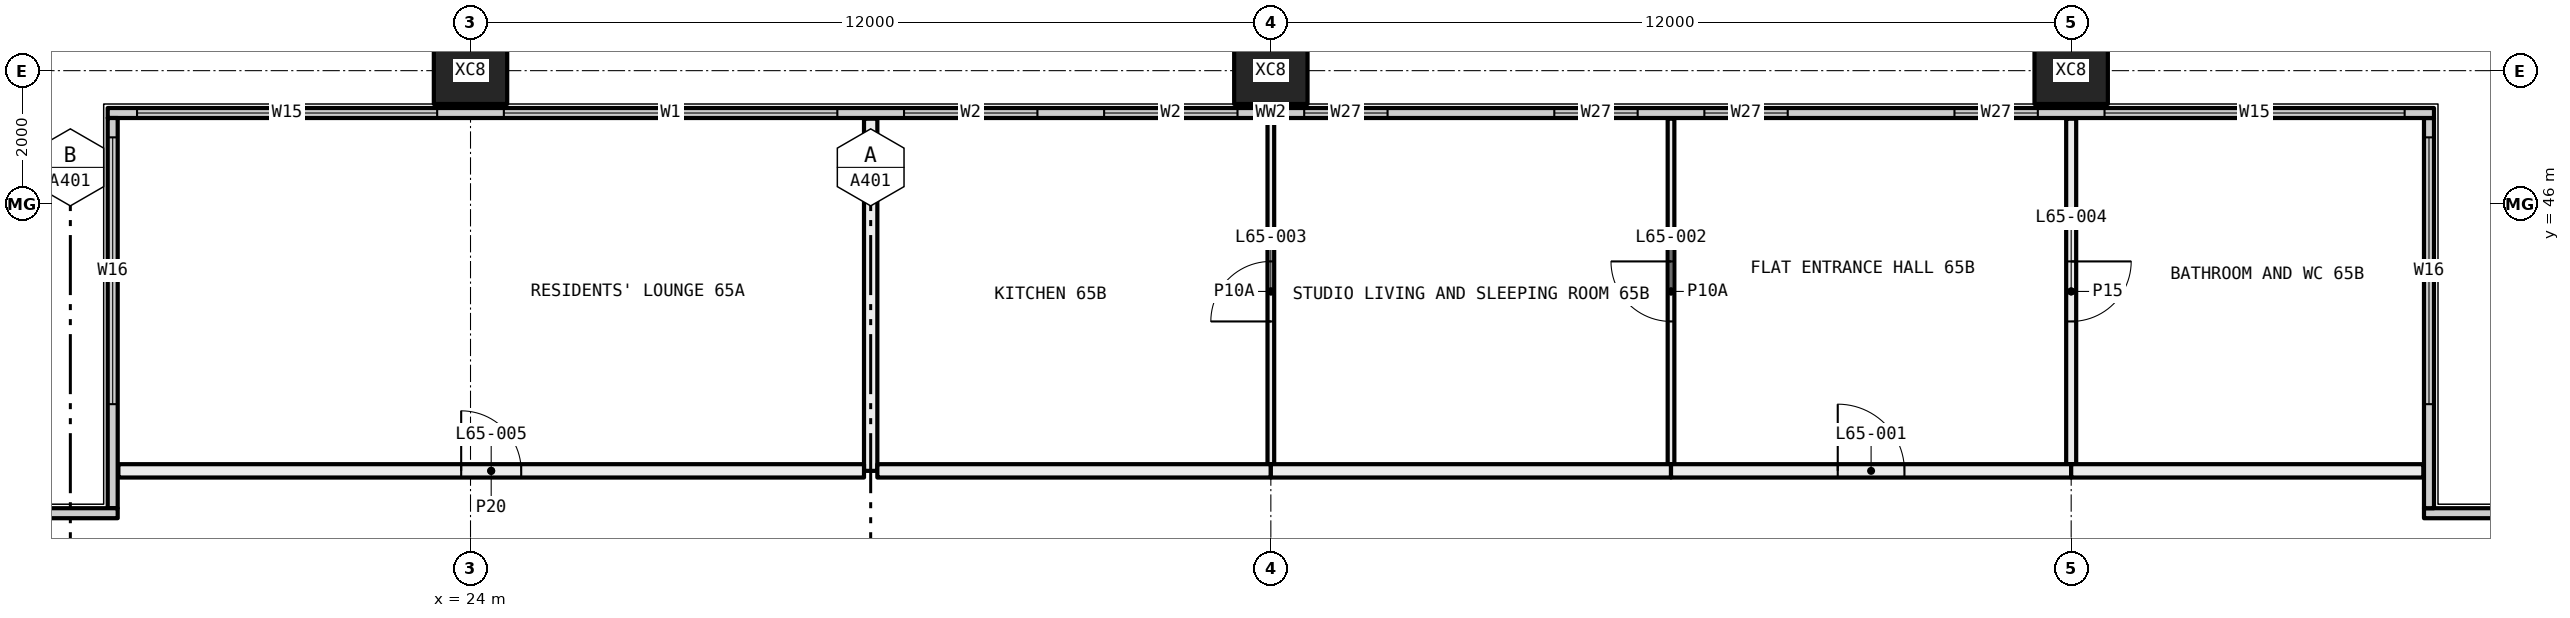
"""IFC4 building model, lengths in metres.
Left out: names, types, materials, properties, quantities, classifications, styles, units other than length and angle.
Written with IfcOpenShell. Run it as: python <this file> out.ifc"""

import sys

from ifc_helpers import new_model, si_unit, direction, frame, frame_2d, origin, origin_2d, place, context, subcontext, project, spatial, rectangle, hollow_rectangle, extrude, element, fill, save


model = new_model("IFC4")
c1 = context("Model", 3, precision=1e-05, world=origin(), true_north=direction((0.0, 1.0)))
c2 = subcontext(c1, "Body", "Model", "MODEL_VIEW")
j1 = project(units=[si_unit("LENGTHUNIT", "METRE"), si_unit("PLANEANGLEUNIT", "RADIAN")], contexts=[c1])
p1 = place(None, origin())
s1 = spatial("IfcSite", under=j1, at=p1, CompositionType="ELEMENT")
p2 = place(p1, origin())
s2 = spatial("IfcBuilding", under=s1, at=p2, CompositionType="ELEMENT")
p3 = place(p2, frame((0.0, 0.0, 242.1)))
s3 = spatial("IfcBuildingStorey", under=s2, at=p3, CompositionType="ELEMENT", Elevation=242.1)
for number, where, z_axis, x_axis in (
    (1, (24.0, 48.0, -0.4), (0.0, 0.0, 1.0), (1.0, 0.0, 0.0)),
    (2, (36.0, 48.0, -0.4), (0.0, 0.0, 1.0), (1.0, 0.0, 0.0)),
    (3, (48.0, 48.0, -0.4), (0.0, 0.0, 1.0), (1.0, 0.0, 0.0)),
):
    element("IfcColumn", number, at=place(p3, frame(where, z_axis=z_axis, x_axis=x_axis)), inside=s3, PredefinedType="COLUMN", context=c2, shape_type="SweptSolid", body=[
        extrude(hollow_rectangle(XDim=1.1, YDim=1.0, WallThickness=0.04, at=origin_2d()), origin(), (0.0, 0.0, 1.0), 3.45),
    ])
p4 = place(p3, frame((53.29, 41.365, 0.0), z_axis=(0.0, 0.0, 1.0), x_axis=(1.0, 0.0, 0.0)))
e4 = element("IfcWall", 4, at=p4, inside=s3, PredefinedType="ELEMENTEDWALL", context=c2, shape_type="SweptSolid", body=[
    extrude(rectangle(XDim=6.15, YDim=0.15, at=frame_2d((3.075, 0.0))), origin(), (0.0, 0.0, 1.0), 3.05),
])
p5 = place(p4, frame((1.71, 0.0, 0.45)))
e5 = element("IfcOpeningElement", 5, at=p5, cuts=e4, PredefinedType="OPENING", context=c2, shape_type="SweptSolid", body=[
    extrude(rectangle(XDim=4.0, YDim=2.55, at=frame_2d((2.0, 1.275))), frame((0.0, 0.085, 0.0), z_axis=(0.0, -1.0, 0.0), x_axis=(1.0, 0.0, 0.0)), (0.0, 0.0, 1.0), 0.17),
])
p6 = place(p3, frame((53.365, 41.44, 0.0), z_axis=(0.0, 0.0, 1.0), x_axis=(0.0, 1.0, 0.0)))
e6 = element("IfcWall", 6, at=p6, inside=s3, PredefinedType="ELEMENTEDWALL", context=c2, shape_type="SweptSolid", body=[
    extrude(rectangle(XDim=5.85, YDim=0.15, at=frame_2d((2.925, 0.0))), origin(), (0.0, 0.0, 1.0), 3.05),
])
p7 = place(p6, frame((1.56, 0.0, 0.45)))
e7 = element("IfcOpeningElement", 7, at=p7, cuts=e6, PredefinedType="OPENING", context=c2, shape_type="SweptSolid", body=[
    extrude(rectangle(XDim=4.0, YDim=2.55, at=frame_2d((2.0, 1.275))), frame((0.0, 0.085, 0.0), z_axis=(0.0, -1.0, 0.0), x_axis=(1.0, 0.0, 0.0)), (0.0, 0.0, 1.0), 0.17),
])
p8 = place(p3, frame((18.56, 47.365, 0.0), z_axis=(0.0, 0.0, 1.0), x_axis=(1.0, 0.0, 0.0)))
e8 = element("IfcWall", 8, at=p8, inside=s3, PredefinedType="ELEMENTEDWALL", context=c2, shape_type="SweptSolid", body=[
    extrude(rectangle(XDim=34.88, YDim=0.15, at=frame_2d((17.44, 0.0))), origin(), (0.0, 0.0, 1.0), 3.05),
])
p9 = place(p8, frame((0.44, 0.0, 0.45)))
e9 = element("IfcOpeningElement", 9, at=p9, cuts=e8, PredefinedType="OPENING", context=c2, shape_type="SweptSolid", body=[
    extrude(rectangle(XDim=4.5, YDim=2.55, at=frame_2d((2.25, 1.275))), frame((0.0, 0.085, 0.0), z_axis=(0.0, -1.0, 0.0), x_axis=(1.0, 0.0, 0.0)), (0.0, 0.0, 1.0), 0.17),
])
p10 = place(p8, frame((5.94, 0.0, 0.45)))
e10 = element("IfcOpeningElement", 10, at=p10, cuts=e8, PredefinedType="OPENING", context=c2, shape_type="SweptSolid", body=[
    extrude(rectangle(XDim=5.0, YDim=2.55, at=frame_2d((2.5, 1.275))), frame((0.0, 0.085, 0.0), z_axis=(0.0, -1.0, 0.0), x_axis=(1.0, 0.0, 0.0)), (0.0, 0.0, 1.0), 0.17),
])
p11 = place(p8, frame((11.94, 0.0, 0.45)))
e11 = element("IfcOpeningElement", 11, at=p11, cuts=e8, PredefinedType="OPENING", context=c2, shape_type="SweptSolid", body=[
    extrude(rectangle(XDim=2.0, YDim=2.55, at=frame_2d((1.0, 1.275))), frame((0.0, 0.085, 0.0), z_axis=(0.0, -1.0, 0.0), x_axis=(1.0, 0.0, 0.0)), (0.0, 0.0, 1.0), 0.17),
])
p12 = place(p8, frame((14.94, 0.0, 0.45)))
e12 = element("IfcOpeningElement", 12, at=p12, cuts=e8, PredefinedType="OPENING", context=c2, shape_type="SweptSolid", body=[
    extrude(rectangle(XDim=2.0, YDim=2.55, at=frame_2d((1.0, 1.275))), frame((0.0, 0.085, 0.0), z_axis=(0.0, -1.0, 0.0), x_axis=(1.0, 0.0, 0.0)), (0.0, 0.0, 1.0), 0.17),
])
p13 = place(p8, frame((17.94, 0.0, 0.45)))
e13 = element("IfcOpeningElement", 13, at=p13, cuts=e8, PredefinedType="OPENING", context=c2, shape_type="SweptSolid", body=[
    extrude(rectangle(XDim=1.25, YDim=2.55, at=frame_2d((0.625, 1.275))), frame((0.0, 0.085, 0.0), z_axis=(0.0, -1.0, 0.0), x_axis=(1.0, 0.0, 0.0)), (0.0, 0.0, 1.0), 0.17),
])
p14 = place(p8, frame((21.69, 0.0, 0.45)))
e14 = element("IfcOpeningElement", 14, at=p14, cuts=e8, PredefinedType="OPENING", context=c2, shape_type="SweptSolid", body=[
    extrude(rectangle(XDim=1.25, YDim=2.55, at=frame_2d((0.625, 1.275))), frame((0.0, 0.085, 0.0), z_axis=(0.0, -1.0, 0.0), x_axis=(1.0, 0.0, 0.0)), (0.0, 0.0, 1.0), 0.17),
])
p15 = place(p8, frame((23.94, 0.0, 0.45)))
e15 = element("IfcOpeningElement", 15, at=p15, cuts=e8, PredefinedType="OPENING", context=c2, shape_type="SweptSolid", body=[
    extrude(rectangle(XDim=1.25, YDim=2.55, at=frame_2d((0.625, 1.275))), frame((0.0, 0.085, 0.0), z_axis=(0.0, -1.0, 0.0), x_axis=(1.0, 0.0, 0.0)), (0.0, 0.0, 1.0), 0.17),
])
p16 = place(p8, frame((27.69, 0.0, 0.45)))
e16 = element("IfcOpeningElement", 16, at=p16, cuts=e8, PredefinedType="OPENING", context=c2, shape_type="SweptSolid", body=[
    extrude(rectangle(XDim=1.25, YDim=2.55, at=frame_2d((0.625, 1.275))), frame((0.0, 0.085, 0.0), z_axis=(0.0, -1.0, 0.0), x_axis=(1.0, 0.0, 0.0)), (0.0, 0.0, 1.0), 0.17),
])
p17 = place(p8, frame((29.94, 0.0, 0.45)))
e17 = element("IfcOpeningElement", 17, at=p17, cuts=e8, PredefinedType="OPENING", context=c2, shape_type="SweptSolid", body=[
    extrude(rectangle(XDim=4.5, YDim=2.55, at=frame_2d((2.25, 1.275))), frame((0.0, 0.085, 0.0), z_axis=(0.0, -1.0, 0.0), x_axis=(1.0, 0.0, 0.0)), (0.0, 0.0, 1.0), 0.17),
])
p18 = place(p3, frame((18.635, 41.44, 0.0), z_axis=(0.0, 0.0, 1.0), x_axis=(0.0, 1.0, 0.0)))
e18 = element("IfcWall", 18, at=p18, inside=s3, PredefinedType="ELEMENTEDWALL", context=c2, shape_type="SweptSolid", body=[
    extrude(rectangle(XDim=5.85, YDim=0.15, at=frame_2d((2.925, 0.0))), origin(), (0.0, 0.0, 1.0), 3.05),
])
p19 = place(p18, frame((1.56, 0.0, 0.45)))
e19 = element("IfcOpeningElement", 19, at=p19, cuts=e18, PredefinedType="OPENING", context=c2, shape_type="SweptSolid", body=[
    extrude(rectangle(XDim=4.0, YDim=2.55, at=frame_2d((2.0, 1.275))), frame((0.0, 0.085, 0.0), z_axis=(0.0, -1.0, 0.0), x_axis=(1.0, 0.0, 0.0)), (0.0, 0.0, 1.0), 0.17),
])
p20 = place(p3, frame((12.56, 41.365, 0.0), z_axis=(0.0, 0.0, 1.0), x_axis=(1.0, 0.0, 0.0)))
e20 = element("IfcWall", 20, at=p20, inside=s3, PredefinedType="ELEMENTEDWALL", context=c2, shape_type="SweptSolid", body=[
    extrude(rectangle(XDim=6.15, YDim=0.15, at=frame_2d((3.075, 0.0))), origin(), (0.0, 0.0, 1.0), 3.05),
])
p21 = place(p20, frame((0.44, 0.0, 0.45)))
e21 = element("IfcOpeningElement", 21, at=p21, cuts=e20, PredefinedType="OPENING", context=c2, shape_type="SweptSolid", body=[
    extrude(rectangle(XDim=4.0, YDim=2.55, at=frame_2d((2.0, 1.275))), frame((0.0, 0.085, 0.0), z_axis=(0.0, -1.0, 0.0), x_axis=(1.0, 0.0, 0.0)), (0.0, 0.0, 1.0), 0.17),
])
p22 = place(p3, frame((30.0, 42.0, 0.0), z_axis=(0.0, 0.0, 1.0), x_axis=(0.0, 1.0, 0.0)))
e22 = element("IfcWall", 22, at=p22, inside=s3, PredefinedType="PARTITIONING", context=c2, shape_type="SweptSolid", body=[
    extrude(rectangle(XDim=5.28, YDim=0.2, at=frame_2d((2.64, 0.0))), origin(), (0.0, 0.0, 1.0), 3.05),
])
p23 = place(p3, frame((18.72, 42.0, 0.0), z_axis=(0.0, 0.0, 1.0), x_axis=(1.0, 0.0, 0.0)))
e23 = element("IfcWall", 23, at=p23, inside=s3, PredefinedType="PARTITIONING", context=c2, shape_type="SweptSolid", body=[
    extrude(rectangle(XDim=11.18, YDim=0.2, at=frame_2d((5.59, 0.0))), origin(), (0.0, 0.0, 1.0), 3.05),
])
p24 = place(p23, frame((5.14, 0.0, 0.0)))
e24 = element("IfcOpeningElement", 24, at=p24, cuts=e23, PredefinedType="OPENING", context=c2, shape_type="SweptSolid", body=[
    extrude(rectangle(XDim=0.9, YDim=2.1, at=frame_2d((0.45, 1.05))), frame((0.0, 0.11, 0.0), z_axis=(0.0, -1.0, 0.0), x_axis=(1.0, 0.0, 0.0)), (0.0, 0.0, 1.0), 0.22),
])
p25 = place(p3, frame((36.0, 42.1, 0.0), z_axis=(0.0, 0.0, 1.0), x_axis=(0.0, 1.0, 0.0)))
e25 = element("IfcWall", 25, at=p25, inside=s3, PredefinedType="PARTITIONING", context=c2, shape_type="SweptSolid", body=[
    extrude(rectangle(XDim=5.18, YDim=0.1, at=frame_2d((2.59, 0.0))), origin(), (0.0, 0.0, 1.0), 2.45),
])
p26 = place(p25, frame((2.14, 0.0, 0.0)))
e26 = element("IfcOpeningElement", 26, at=p26, cuts=e25, PredefinedType="OPENING", context=c2, shape_type="SweptSolid", body=[
    extrude(rectangle(XDim=0.9, YDim=2.1, at=frame_2d((0.45, 1.05))), frame((0.0, 0.06, 0.0), z_axis=(0.0, -1.0, 0.0), x_axis=(1.0, 0.0, 0.0)), (0.0, 0.0, 1.0), 0.12),
])
p27 = place(p3, frame((30.1, 42.0, 0.0), z_axis=(0.0, 0.0, 1.0), x_axis=(1.0, 0.0, 0.0)))
e27 = element("IfcWall", 27, at=p27, inside=s3, PredefinedType="PARTITIONING", context=c2, shape_type="SweptSolid", body=[
    extrude(rectangle(XDim=5.9, YDim=0.2, at=frame_2d((2.95, 0.0))), origin(), (0.0, 0.0, 1.0), 2.45),
])
p28 = place(p3, frame((42.0, 42.1, 0.0), z_axis=(0.0, 0.0, 1.0), x_axis=(0.0, 1.0, 0.0)))
e28 = element("IfcWall", 28, at=p28, inside=s3, PredefinedType="PARTITIONING", context=c2, shape_type="SweptSolid", body=[
    extrude(rectangle(XDim=5.18, YDim=0.1, at=frame_2d((2.59, 0.0))), origin(), (0.0, 0.0, 1.0), 3.05),
])
p29 = place(p28, frame((2.14, 0.0, 0.0)))
e29 = element("IfcOpeningElement", 29, at=p29, cuts=e28, PredefinedType="OPENING", context=c2, shape_type="SweptSolid", body=[
    extrude(rectangle(XDim=0.9, YDim=2.1, at=frame_2d((0.45, 1.05))), frame((0.0, 0.06, 0.0), z_axis=(0.0, -1.0, 0.0), x_axis=(1.0, 0.0, 0.0)), (0.0, 0.0, 1.0), 0.12),
])
p30 = place(p3, frame((36.0, 42.0, 0.0), z_axis=(0.0, 0.0, 1.0), x_axis=(1.0, 0.0, 0.0)))
e30 = element("IfcWall", 30, at=p30, inside=s3, PredefinedType="PARTITIONING", context=c2, shape_type="SweptSolid", body=[
    extrude(rectangle(XDim=6.0, YDim=0.2, at=frame_2d((3.0, 0.0))), origin(), (0.0, 0.0, 1.0), 2.45),
])
p31 = place(p3, frame((48.0, 42.1, 0.0), z_axis=(0.0, 0.0, 1.0), x_axis=(0.0, 1.0, 0.0)))
e31 = element("IfcWall", 31, at=p31, inside=s3, PredefinedType="PARTITIONING", context=c2, shape_type="SweptSolid", body=[
    extrude(rectangle(XDim=5.18, YDim=0.15, at=frame_2d((2.59, 0.0))), origin(), (0.0, 0.0, 1.0), 3.05),
])
p32 = place(p31, frame((2.14, 0.0, 0.0)))
e32 = element("IfcOpeningElement", 32, at=p32, cuts=e31, PredefinedType="OPENING", context=c2, shape_type="SweptSolid", body=[
    extrude(rectangle(XDim=0.9, YDim=2.1, at=frame_2d((0.45, 1.05))), frame((0.0, 0.085, 0.0), z_axis=(0.0, -1.0, 0.0), x_axis=(1.0, 0.0, 0.0)), (0.0, 0.0, 1.0), 0.17),
])
p33 = place(p3, frame((42.0, 42.0, 0.0), z_axis=(0.0, 0.0, 1.0), x_axis=(1.0, 0.0, 0.0)))
e33 = element("IfcWall", 33, at=p33, inside=s3, PredefinedType="PARTITIONING", context=c2, shape_type="SweptSolid", body=[
    extrude(rectangle(XDim=6.0, YDim=0.2, at=frame_2d((3.0, 0.0))), origin(), (0.0, 0.0, 1.0), 3.05),
])
p34 = place(p33, frame((2.5, 0.0, 0.0)))
e34 = element("IfcOpeningElement", 34, at=p34, cuts=e33, PredefinedType="OPENING", context=c2, shape_type="SweptSolid", body=[
    extrude(rectangle(XDim=1.0, YDim=2.1, at=frame_2d((0.5, 1.05))), frame((0.0, 0.11, 0.0), z_axis=(0.0, -1.0, 0.0), x_axis=(1.0, 0.0, 0.0)), (0.0, 0.0, 1.0), 0.22),
])
p35 = place(p3, frame((48.0, 42.0, 0.0), z_axis=(0.0, 0.0, 1.0), x_axis=(1.0, 0.0, 0.0)))
e35 = element("IfcWall", 35, at=p35, inside=s3, PredefinedType="PARTITIONING", context=c2, shape_type="SweptSolid", body=[
    extrude(rectangle(XDim=5.28, YDim=0.2, at=frame_2d((2.64, 0.0))), origin(), (0.0, 0.0, 1.0), 3.05),
])
p36 = place(p7, origin())
e36 = element("IfcWindow", 36, at=p36, inside=s3, PartitioningType="SINGLE_PANEL", PredefinedType="WINDOW", context=c2, shape_type="SweptSolid", body=[
    extrude(rectangle(XDim=4.0, YDim=2.55, at=frame_2d((2.0, 1.275))), frame((0.0, 0.03, 0.0), z_axis=(0.0, -1.0, 0.0), x_axis=(1.0, 0.0, 0.0)), (0.0, 0.0, 1.0), 0.06),
])
fill(e7, e36)
p37 = place(p9, origin())
e37 = element("IfcWindow", 37, at=p37, inside=s3, PartitioningType="SINGLE_PANEL", PredefinedType="WINDOW", context=c2, shape_type="SweptSolid", body=[
    extrude(rectangle(XDim=4.5, YDim=2.55, at=frame_2d((2.25, 1.275))), frame((0.0, 0.03, 0.0), z_axis=(0.0, -1.0, 0.0), x_axis=(1.0, 0.0, 0.0)), (0.0, 0.0, 1.0), 0.06),
])
fill(e9, e37)
p38 = place(p10, origin())
e38 = element("IfcWindow", 38, at=p38, inside=s3, PartitioningType="SINGLE_PANEL", PredefinedType="WINDOW", context=c2, shape_type="SweptSolid", body=[
    extrude(rectangle(XDim=5.0, YDim=2.55, at=frame_2d((2.5, 1.275))), frame((0.0, 0.03, 0.0), z_axis=(0.0, -1.0, 0.0), x_axis=(1.0, 0.0, 0.0)), (0.0, 0.0, 1.0), 0.06),
])
fill(e10, e38)
p39 = place(p11, origin())
e39 = element("IfcWindow", 39, at=p39, inside=s3, PartitioningType="SINGLE_PANEL", PredefinedType="WINDOW", context=c2, shape_type="SweptSolid", body=[
    extrude(rectangle(XDim=2.0, YDim=2.55, at=frame_2d((1.0, 1.275))), frame((0.0, 0.03, 0.0), z_axis=(0.0, -1.0, 0.0), x_axis=(1.0, 0.0, 0.0)), (0.0, 0.0, 1.0), 0.06),
])
fill(e11, e39)
p40 = place(p12, origin())
e40 = element("IfcWindow", 40, at=p40, inside=s3, PartitioningType="SINGLE_PANEL", PredefinedType="WINDOW", context=c2, shape_type="SweptSolid", body=[
    extrude(rectangle(XDim=2.0, YDim=2.55, at=frame_2d((1.0, 1.275))), frame((0.0, 0.03, 0.0), z_axis=(0.0, -1.0, 0.0), x_axis=(1.0, 0.0, 0.0)), (0.0, 0.0, 1.0), 0.06),
])
fill(e12, e40)
p41 = place(p13, origin())
e41 = element("IfcWindow", 41, at=p41, inside=s3, PartitioningType="SINGLE_PANEL", PredefinedType="WINDOW", context=c2, shape_type="SweptSolid", body=[
    extrude(rectangle(XDim=1.25, YDim=2.55, at=frame_2d((0.625, 1.275))), frame((0.0, 0.03, 0.0), z_axis=(0.0, -1.0, 0.0), x_axis=(1.0, 0.0, 0.0)), (0.0, 0.0, 1.0), 0.06),
])
fill(e13, e41)
p42 = place(p14, origin())
e42 = element("IfcWindow", 42, at=p42, inside=s3, PartitioningType="SINGLE_PANEL", PredefinedType="WINDOW", context=c2, shape_type="SweptSolid", body=[
    extrude(rectangle(XDim=1.25, YDim=2.55, at=frame_2d((0.625, 1.275))), frame((0.0, 0.03, 0.0), z_axis=(0.0, -1.0, 0.0), x_axis=(1.0, 0.0, 0.0)), (0.0, 0.0, 1.0), 0.06),
])
fill(e14, e42)
p43 = place(p15, origin())
e43 = element("IfcWindow", 43, at=p43, inside=s3, PartitioningType="SINGLE_PANEL", PredefinedType="WINDOW", context=c2, shape_type="SweptSolid", body=[
    extrude(rectangle(XDim=1.25, YDim=2.55, at=frame_2d((0.625, 1.275))), frame((0.0, 0.03, 0.0), z_axis=(0.0, -1.0, 0.0), x_axis=(1.0, 0.0, 0.0)), (0.0, 0.0, 1.0), 0.06),
])
fill(e15, e43)
p44 = place(p16, origin())
e44 = element("IfcWindow", 44, at=p44, inside=s3, PartitioningType="SINGLE_PANEL", PredefinedType="WINDOW", context=c2, shape_type="SweptSolid", body=[
    extrude(rectangle(XDim=1.25, YDim=2.55, at=frame_2d((0.625, 1.275))), frame((0.0, 0.03, 0.0), z_axis=(0.0, -1.0, 0.0), x_axis=(1.0, 0.0, 0.0)), (0.0, 0.0, 1.0), 0.06),
])
fill(e16, e44)
p45 = place(p17, origin())
e45 = element("IfcWindow", 45, at=p45, inside=s3, PartitioningType="SINGLE_PANEL", PredefinedType="WINDOW", context=c2, shape_type="SweptSolid", body=[
    extrude(rectangle(XDim=4.5, YDim=2.55, at=frame_2d((2.25, 1.275))), frame((0.0, 0.03, 0.0), z_axis=(0.0, -1.0, 0.0), x_axis=(1.0, 0.0, 0.0)), (0.0, 0.0, 1.0), 0.06),
])
fill(e17, e45)
p46 = place(p19, origin())
e46 = element("IfcWindow", 46, at=p46, inside=s3, PartitioningType="SINGLE_PANEL", PredefinedType="WINDOW", context=c2, shape_type="SweptSolid", body=[
    extrude(rectangle(XDim=4.0, YDim=2.55, at=frame_2d((2.0, 1.275))), frame((0.0, 0.03, 0.0), z_axis=(0.0, -1.0, 0.0), x_axis=(1.0, 0.0, 0.0)), (0.0, 0.0, 1.0), 0.06),
])
fill(e19, e46)
p47 = place(p34, origin())
e47 = element("IfcDoor", 47, at=p47, inside=s3, OperationType="SINGLE_SWING_RIGHT", PredefinedType="DOOR", context=c2, shape_type="SweptSolid", body=[
    extrude(rectangle(XDim=1.0, YDim=2.1, at=frame_2d((0.5, 1.05))), frame((0.0, 0.025, 0.0), z_axis=(0.0, -1.0, 0.0), x_axis=(1.0, 0.0, 0.0)), (0.0, 0.0, 1.0), 0.05),
])
fill(e34, e47)
p48 = place(p29, origin())
e48 = element("IfcDoor", 48, at=p48, inside=s3, OperationType="SINGLE_SWING_LEFT", PredefinedType="DOOR", context=c2, shape_type="SweptSolid", body=[
    extrude(rectangle(XDim=0.9, YDim=2.1, at=frame_2d((0.45, 1.05))), frame((0.0, 0.025, 0.0), z_axis=(0.0, -1.0, 0.0), x_axis=(1.0, 0.0, 0.0)), (0.0, 0.0, 1.0), 0.05),
])
fill(e29, e48)
p49 = place(p26, origin())
e49 = element("IfcDoor", 49, at=p49, inside=s3, OperationType="SINGLE_SWING_RIGHT", PredefinedType="DOOR", context=c2, shape_type="SweptSolid", body=[
    extrude(rectangle(XDim=0.9, YDim=2.1, at=frame_2d((0.45, 1.05))), frame((0.0, 0.025, 0.0), z_axis=(0.0, -1.0, 0.0), x_axis=(1.0, 0.0, 0.0)), (0.0, 0.0, 1.0), 0.05),
])
fill(e26, e49)
p50 = place(p32, frame((0.9, 0.0, 0.0), x_axis=(-1.0, 0.0, 0.0)))
e50 = element("IfcDoor", 50, at=p50, inside=s3, OperationType="SINGLE_SWING_RIGHT", PredefinedType="DOOR", context=c2, shape_type="SweptSolid", body=[
    extrude(rectangle(XDim=0.9, YDim=2.1, at=frame_2d((0.45, 1.05))), frame((0.0, 0.025, 0.0), z_axis=(0.0, -1.0, 0.0), x_axis=(1.0, 0.0, 0.0)), (0.0, 0.0, 1.0), 0.05),
])
fill(e32, e50)
p51 = place(p24, origin())
e51 = element("IfcDoor", 51, at=p51, inside=s3, OperationType="SINGLE_SWING_RIGHT", PredefinedType="DOOR", context=c2, shape_type="SweptSolid", body=[
    extrude(rectangle(XDim=0.9, YDim=2.1, at=frame_2d((0.45, 1.05))), frame((0.0, 0.025, 0.0), z_axis=(0.0, -1.0, 0.0), x_axis=(1.0, 0.0, 0.0)), (0.0, 0.0, 1.0), 0.05),
])
fill(e24, e51)
save(model, sys.argv[1])
